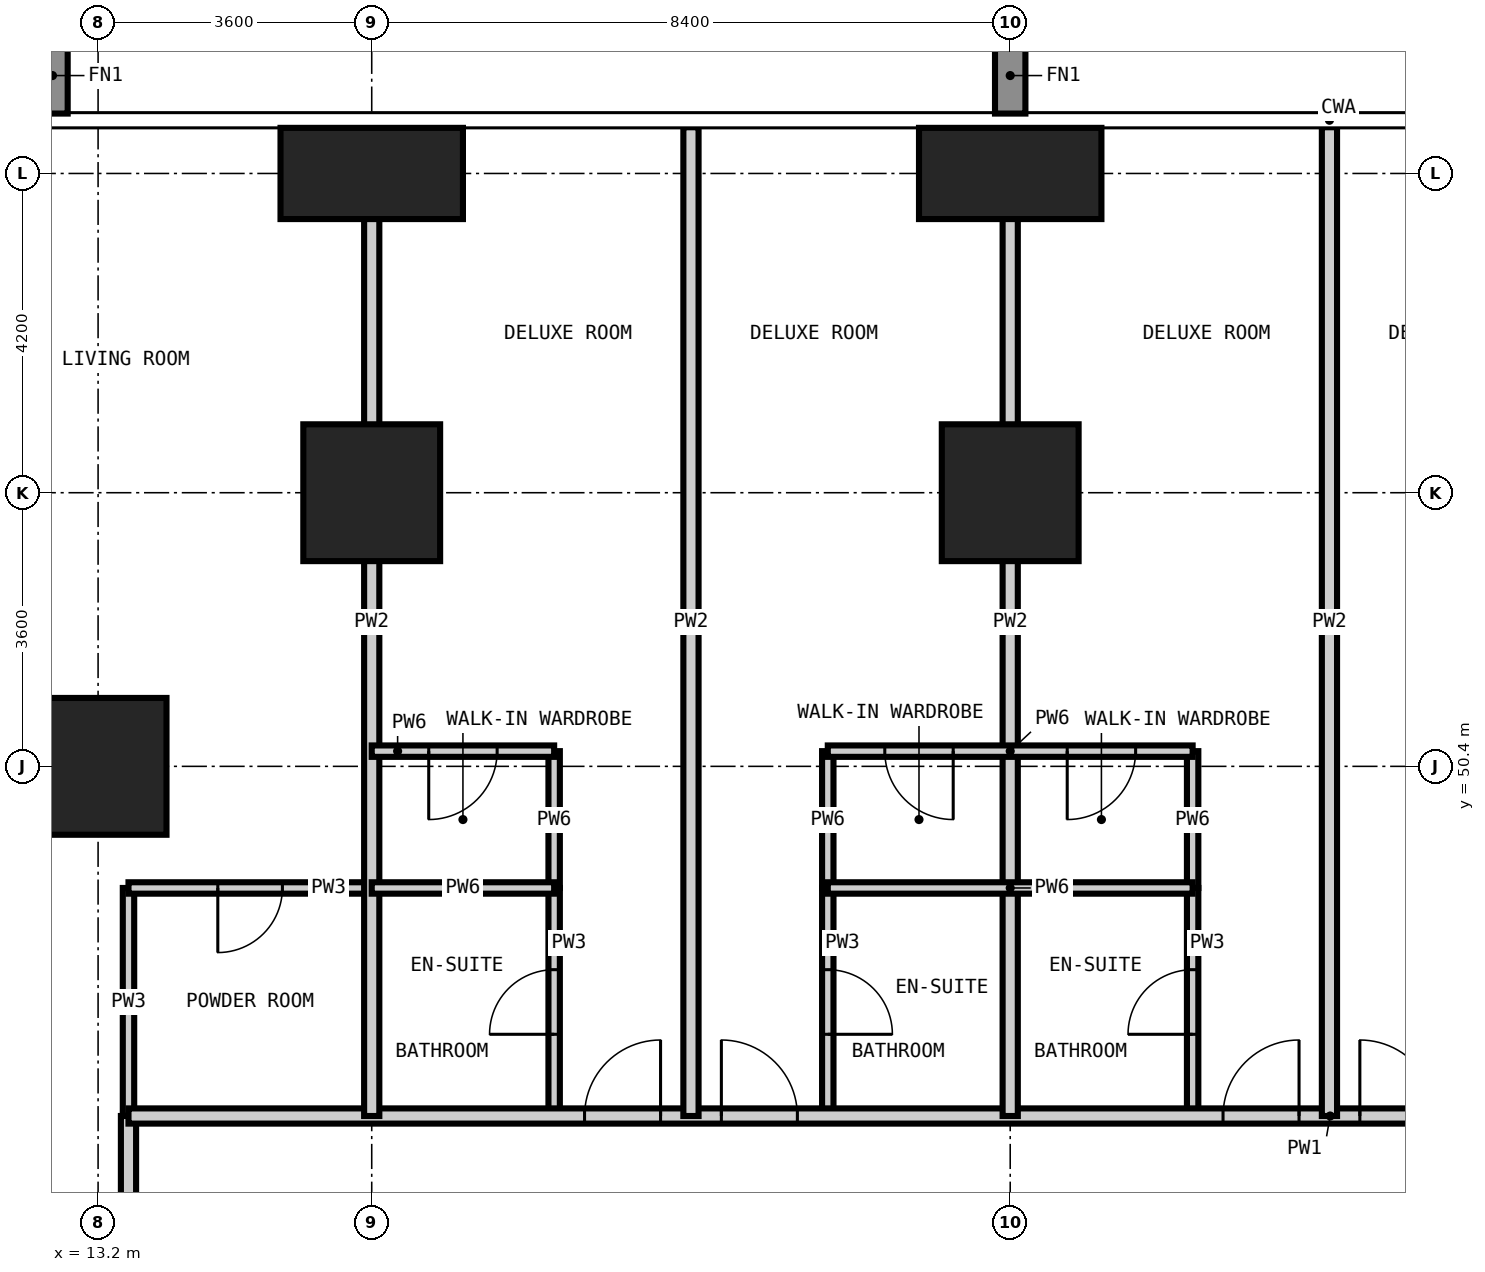
"""IFC4 building model, lengths in metres.
Left out: names, types, materials, properties, quantities, classifications, styles, units other than length and angle.
Written with IfcOpenShell. Run it as: python <this file> out.ifc"""

import sys

from ifc_helpers import new_model, si_unit, direction, frame, frame_2d, origin, origin_2d, place, context, subcontext, project, spatial, rectangle, extrude, element, fill, save


model = new_model("IFC4")
c1 = context("Model", 3, precision=1e-05, world=origin(), true_north=direction((0.0, 1.0)))
c2 = subcontext(c1, "Body", "Model", "MODEL_VIEW")
j1 = project(units=[si_unit("LENGTHUNIT", "METRE"), si_unit("PLANEANGLEUNIT", "RADIAN")], contexts=[c1])
p1 = place(None, origin())
s1 = spatial("IfcSite", under=j1, at=p1, CompositionType="ELEMENT")
p2 = place(p1, origin())
s2 = spatial("IfcBuilding", under=s1, at=p2, CompositionType="ELEMENT")
p3 = place(p2, frame((0.0, 0.0, 30.6)))
s3 = spatial("IfcBuildingStorey", under=s2, at=p3, CompositionType="ELEMENT", Elevation=30.6)
for number, where, z_axis, x_axis in (
    (1, (13.2, 50.4, -0.35), (0.0, 0.0, 1.0), (1.0, 0.0, 0.0)),
    (2, (16.8, 54.0, -0.35), (0.0, 0.0, 1.0), (1.0, 0.0, 0.0)),
):
    element("IfcColumn", number, at=place(p3, frame(where, z_axis=z_axis, x_axis=x_axis)), inside=s3, PredefinedType="COLUMN", context=c2, shape_type="SweptSolid", body=[
        extrude(rectangle(XDim=1.8, YDim=1.8, at=origin_2d()), origin(), (0.0, 0.0, 1.0), 3.6),
    ])
p4 = place(p3, frame((16.8, 58.2, -0.35), z_axis=(0.0, 0.0, 1.0), x_axis=(1.0, 0.0, 0.0)))
e3 = element("IfcColumn", 3, at=p4, inside=s3, PredefinedType="COLUMN", context=c2, shape_type="SweptSolid", body=[
    extrude(rectangle(XDim=2.4, YDim=1.2, at=origin_2d()), origin(), (0.0, 0.0, 1.0), 3.6),
])
p5 = place(p3, frame((25.2, 54.0, -0.35), z_axis=(0.0, 0.0, 1.0), x_axis=(1.0, 0.0, 0.0)))
e4 = element("IfcColumn", 4, at=p5, inside=s3, PredefinedType="COLUMN", context=c2, shape_type="SweptSolid", body=[
    extrude(rectangle(XDim=1.8, YDim=1.8, at=origin_2d()), origin(), (0.0, 0.0, 1.0), 3.6),
])
p6 = place(p3, frame((25.2, 58.2, -0.35), z_axis=(0.0, 0.0, 1.0), x_axis=(1.0, 0.0, 0.0)))
e5 = element("IfcColumn", 5, at=p6, inside=s3, PredefinedType="COLUMN", context=c2, shape_type="SweptSolid", body=[
    extrude(rectangle(XDim=2.4, YDim=1.2, at=origin_2d()), origin(), (0.0, 0.0, 1.0), 3.6),
])
p7 = place(p3, frame((13.6, 45.8, 0.0), z_axis=(0.0, 0.0, 1.0), x_axis=(0.0, 1.0, 0.0)))
e6 = element("IfcWall", 6, at=p7, inside=s3, PredefinedType="PARTITIONING", context=c2, shape_type="SweptSolid", body=[
    extrude(rectangle(XDim=3.0, YDim=0.15, at=frame_2d((1.5, 0.0))), origin(), (0.0, 0.0, 1.0), 3.25),
])
p8 = place(p3, frame((19.2, 45.8, 0.0), z_axis=(0.0, 0.0, 1.0), x_axis=(0.0, 1.0, 0.0)))
e7 = element("IfcWall", 7, at=p8, inside=s3, PredefinedType="PARTITIONING", context=c2, shape_type="SweptSolid", body=[
    extrude(rectangle(XDim=3.0, YDim=0.15, at=frame_2d((1.5, 0.0))), origin(), (0.0, 0.0, 1.0), 3.25),
])
p9 = place(p8, frame((1.075, 0.0, 0.0)))
e8 = element("IfcOpeningElement", 8, at=p9, cuts=e7, PredefinedType="OPENING", context=c2, shape_type="SweptSolid", body=[
    extrude(rectangle(XDim=0.85, YDim=2.1, at=frame_2d((0.425, 1.05))), frame((0.0, 0.085, 0.0), z_axis=(0.0, -1.0, 0.0), x_axis=(1.0, 0.0, 0.0)), (0.0, 0.0, 1.0), 0.17),
])
p10 = place(p3, frame((22.8, 45.8, 0.0), z_axis=(0.0, 0.0, 1.0), x_axis=(0.0, 1.0, 0.0)))
e9 = element("IfcWall", 9, at=p10, inside=s3, PredefinedType="PARTITIONING", context=c2, shape_type="SweptSolid", body=[
    extrude(rectangle(XDim=3.0, YDim=0.15, at=frame_2d((1.5, 0.0))), origin(), (0.0, 0.0, 1.0), 3.25),
])
p11 = place(p10, frame((1.075, 0.0, 0.0)))
e10 = element("IfcOpeningElement", 10, at=p11, cuts=e9, PredefinedType="OPENING", context=c2, shape_type="SweptSolid", body=[
    extrude(rectangle(XDim=0.85, YDim=2.1, at=frame_2d((0.425, 1.05))), frame((0.0, 0.085, 0.0), z_axis=(0.0, -1.0, 0.0), x_axis=(1.0, 0.0, 0.0)), (0.0, 0.0, 1.0), 0.17),
])
p12 = place(p3, frame((27.6, 45.8, 0.0), z_axis=(0.0, 0.0, 1.0), x_axis=(0.0, 1.0, 0.0)))
e11 = element("IfcWall", 11, at=p12, inside=s3, PredefinedType="PARTITIONING", context=c2, shape_type="SweptSolid", body=[
    extrude(rectangle(XDim=3.0, YDim=0.15, at=frame_2d((1.5, 0.0))), origin(), (0.0, 0.0, 1.0), 3.25),
])
p13 = place(p12, frame((1.075, 0.0, 0.0)))
e12 = element("IfcOpeningElement", 12, at=p13, cuts=e11, PredefinedType="OPENING", context=c2, shape_type="SweptSolid", body=[
    extrude(rectangle(XDim=0.85, YDim=2.1, at=frame_2d((0.425, 1.05))), frame((0.0, 0.085, 0.0), z_axis=(0.0, -1.0, 0.0), x_axis=(1.0, 0.0, 0.0)), (0.0, 0.0, 1.0), 0.17),
])
p14 = place(p3, frame((13.6, 48.8, 0.0), z_axis=(0.0, 0.0, 1.0), x_axis=(1.0, 0.0, 0.0)))
e13 = element("IfcWall", 13, at=p14, inside=s3, PredefinedType="PARTITIONING", context=c2, shape_type="SweptSolid", body=[
    extrude(rectangle(XDim=3.2, YDim=0.15, at=frame_2d((1.6, 0.0))), origin(), (0.0, 0.0, 1.0), 3.25),
])
p15 = place(p14, frame((1.175, 0.0, 0.0)))
e14 = element("IfcOpeningElement", 14, at=p15, cuts=e13, PredefinedType="OPENING", context=c2, shape_type="SweptSolid", body=[
    extrude(rectangle(XDim=0.85, YDim=2.1, at=frame_2d((0.425, 1.05))), frame((0.0, 0.085, 0.0), z_axis=(0.0, -1.0, 0.0), x_axis=(1.0, 0.0, 0.0)), (0.0, 0.0, 1.0), 0.17),
])
p16 = place(p3, frame((13.6, 42.0, 0.0), z_axis=(0.0, 0.0, 1.0), x_axis=(0.0, 1.0, 0.0)))
e15 = element("IfcWall", 15, at=p16, inside=s3, PredefinedType="PARTITIONING", context=c2, shape_type="SweptSolid", body=[
    extrude(rectangle(XDim=3.8, YDim=0.2, at=frame_2d((1.9, 0.0))), origin(), (0.0, 0.0, 1.0), 3.25),
])
p17 = place(p16, frame((1.4, 0.0, 0.0)))
e16 = element("IfcOpeningElement", 16, at=p17, cuts=e15, PredefinedType="OPENING", context=c2, shape_type="SweptSolid", body=[
    extrude(rectangle(XDim=1.0, YDim=2.2, at=frame_2d((0.5, 1.1))), frame((0.0, 0.11, 0.0), z_axis=(0.0, -1.0, 0.0), x_axis=(1.0, 0.0, 0.0)), (0.0, 0.0, 1.0), 0.22),
])
p18 = place(p3, frame((13.6, 45.8, 0.0), z_axis=(0.0, 0.0, 1.0), x_axis=(1.0, 0.0, 0.0)))
e17 = element("IfcWall", 17, at=p18, inside=s3, PredefinedType="PARTITIONING", context=c2, shape_type="SweptSolid", body=[
    extrude(rectangle(XDim=31.9, YDim=0.2, at=frame_2d((15.95, 0.0))), origin(), (0.0, 0.0, 1.0), 3.25),
])
p19 = place(p18, frame((6.0, 0.0, 0.0)))
e18 = element("IfcOpeningElement", 18, at=p19, cuts=e17, PredefinedType="OPENING", context=c2, shape_type="SweptSolid", body=[
    extrude(rectangle(XDim=1.0, YDim=2.2, at=frame_2d((0.5, 1.1))), frame((0.0, 0.11, 0.0), z_axis=(0.0, -1.0, 0.0), x_axis=(1.0, 0.0, 0.0)), (0.0, 0.0, 1.0), 0.22),
])
p20 = place(p18, frame((7.8, 0.0, 0.0)))
e19 = element("IfcOpeningElement", 19, at=p20, cuts=e17, PredefinedType="OPENING", context=c2, shape_type="SweptSolid", body=[
    extrude(rectangle(XDim=1.0, YDim=2.2, at=frame_2d((0.5, 1.1))), frame((0.0, 0.11, 0.0), z_axis=(0.0, -1.0, 0.0), x_axis=(1.0, 0.0, 0.0)), (0.0, 0.0, 1.0), 0.22),
])
p21 = place(p18, frame((14.4, 0.0, 0.0)))
e20 = element("IfcOpeningElement", 20, at=p21, cuts=e17, PredefinedType="OPENING", context=c2, shape_type="SweptSolid", body=[
    extrude(rectangle(XDim=1.0, YDim=2.2, at=frame_2d((0.5, 1.1))), frame((0.0, 0.11, 0.0), z_axis=(0.0, -1.0, 0.0), x_axis=(1.0, 0.0, 0.0)), (0.0, 0.0, 1.0), 0.22),
])
p22 = place(p18, frame((16.2, 0.0, 0.0)))
e21 = element("IfcOpeningElement", 21, at=p22, cuts=e17, PredefinedType="OPENING", context=c2, shape_type="SweptSolid", body=[
    extrude(rectangle(XDim=1.0, YDim=2.2, at=frame_2d((0.5, 1.1))), frame((0.0, 0.11, 0.0), z_axis=(0.0, -1.0, 0.0), x_axis=(1.0, 0.0, 0.0)), (0.0, 0.0, 1.0), 0.22),
])
p23 = place(p18, frame((22.8, 0.0, 0.0)))
e22 = element("IfcOpeningElement", 22, at=p23, cuts=e17, PredefinedType="OPENING", context=c2, shape_type="SweptSolid", body=[
    extrude(rectangle(XDim=1.0, YDim=2.2, at=frame_2d((0.5, 1.1))), frame((0.0, 0.11, 0.0), z_axis=(0.0, -1.0, 0.0), x_axis=(1.0, 0.0, 0.0)), (0.0, 0.0, 1.0), 0.22),
])
p24 = place(p18, frame((24.6, 0.0, 0.0)))
e23 = element("IfcOpeningElement", 23, at=p24, cuts=e17, PredefinedType="OPENING", context=c2, shape_type="SweptSolid", body=[
    extrude(rectangle(XDim=1.0, YDim=2.2, at=frame_2d((0.5, 1.1))), frame((0.0, 0.11, 0.0), z_axis=(0.0, -1.0, 0.0), x_axis=(1.0, 0.0, 0.0)), (0.0, 0.0, 1.0), 0.22),
])
for number, where, z_axis, x_axis in (
    (24, (16.8, 45.8, 0.0), (0.0, 0.0, 1.0), (0.0, 1.0, 0.0)),
    (25, (21.0, 45.8, 0.0), (0.0, 0.0, 1.0), (0.0, 1.0, 0.0)),
    (26, (25.2, 45.8, 0.0), (0.0, 0.0, 1.0), (0.0, 1.0, 0.0)),
    (27, (29.4, 45.8, 0.0), (0.0, 0.0, 1.0), (0.0, 1.0, 0.0)),
):
    element("IfcWall", number, at=place(p3, frame(where, z_axis=z_axis, x_axis=x_axis)), inside=s3, PredefinedType="PARTITIONING", context=c2, shape_type="SweptSolid", body=[
        extrude(rectangle(XDim=13.008, YDim=0.2, at=frame_2d((6.504, 0.0))), origin(), (0.0, 0.0, 1.0), 3.25),
    ])
for number, where, z_axis, x_axis in (
    (28, (19.2, 48.8, 0.0), (0.0, 0.0, 1.0), (0.0, 1.0, 0.0)),
    (29, (22.8, 48.8, 0.0), (0.0, 0.0, 1.0), (0.0, 1.0, 0.0)),
    (30, (27.6, 48.8, 0.0), (0.0, 0.0, 1.0), (0.0, 1.0, 0.0)),
):
    element("IfcWall", number, at=place(p3, frame(where, z_axis=z_axis, x_axis=x_axis)), inside=s3, PredefinedType="PARTITIONING", context=c2, shape_type="SweptSolid", body=[
        extrude(rectangle(XDim=1.8, YDim=0.15, at=frame_2d((0.9, 0.0))), origin(), (0.0, 0.0, 1.0), 3.25),
    ])
p25 = place(p3, frame((16.8, 48.8, 0.0), z_axis=(0.0, 0.0, 1.0), x_axis=(1.0, 0.0, 0.0)))
e31 = element("IfcWall", 31, at=p25, inside=s3, PredefinedType="PARTITIONING", context=c2, shape_type="SweptSolid", body=[
    extrude(rectangle(XDim=2.4, YDim=0.15, at=frame_2d((1.2, 0.0))), origin(), (0.0, 0.0, 1.0), 3.25),
])
p26 = place(p3, frame((22.8, 48.8, 0.0), z_axis=(0.0, 0.0, 1.0), x_axis=(1.0, 0.0, 0.0)))
e32 = element("IfcWall", 32, at=p26, inside=s3, PredefinedType="PARTITIONING", context=c2, shape_type="SweptSolid", body=[
    extrude(rectangle(XDim=4.8, YDim=0.15, at=frame_2d((2.4, 0.0))), origin(), (0.0, 0.0, 1.0), 3.25),
])
p27 = place(p3, frame((16.8, 50.6, 0.0), z_axis=(0.0, 0.0, 1.0), x_axis=(1.0, 0.0, 0.0)))
e33 = element("IfcWall", 33, at=p27, inside=s3, PredefinedType="PARTITIONING", context=c2, shape_type="SweptSolid", body=[
    extrude(rectangle(XDim=2.4, YDim=0.15, at=frame_2d((1.2, 0.0))), origin(), (0.0, 0.0, 1.0), 3.25),
])
p28 = place(p27, frame((0.75, 0.0, 0.0)))
e34 = element("IfcOpeningElement", 34, at=p28, cuts=e33, PredefinedType="OPENING", context=c2, shape_type="SweptSolid", body=[
    extrude(rectangle(XDim=0.9, YDim=2.1, at=frame_2d((0.45, 1.05))), frame((0.0, 0.085, 0.0), z_axis=(0.0, -1.0, 0.0), x_axis=(1.0, 0.0, 0.0)), (0.0, 0.0, 1.0), 0.17),
])
p29 = place(p3, frame((22.8, 50.6, 0.0), z_axis=(0.0, 0.0, 1.0), x_axis=(1.0, 0.0, 0.0)))
e35 = element("IfcWall", 35, at=p29, inside=s3, PredefinedType="PARTITIONING", context=c2, shape_type="SweptSolid", body=[
    extrude(rectangle(XDim=4.8, YDim=0.15, at=frame_2d((2.4, 0.0))), origin(), (0.0, 0.0, 1.0), 3.25),
])
p30 = place(p29, frame((0.75, 0.0, 0.0)))
e36 = element("IfcOpeningElement", 36, at=p30, cuts=e35, PredefinedType="OPENING", context=c2, shape_type="SweptSolid", body=[
    extrude(rectangle(XDim=0.9, YDim=2.1, at=frame_2d((0.45, 1.05))), frame((0.0, 0.085, 0.0), z_axis=(0.0, -1.0, 0.0), x_axis=(1.0, 0.0, 0.0)), (0.0, 0.0, 1.0), 0.17),
])
p31 = place(p29, frame((3.15, 0.0, 0.0)))
e37 = element("IfcOpeningElement", 37, at=p31, cuts=e35, PredefinedType="OPENING", context=c2, shape_type="SweptSolid", body=[
    extrude(rectangle(XDim=0.9, YDim=2.1, at=frame_2d((0.45, 1.05))), frame((0.0, 0.085, 0.0), z_axis=(0.0, -1.0, 0.0), x_axis=(1.0, 0.0, 0.0)), (0.0, 0.0, 1.0), 0.17),
])
p32 = place(p19, origin())
e38 = element("IfcDoor", 38, at=p32, inside=s3, OperationType="SINGLE_SWING_RIGHT", PredefinedType="DOOR", context=c2, shape_type="SweptSolid", body=[
    extrude(rectangle(XDim=1.0, YDim=2.2, at=frame_2d((0.5, 1.1))), frame((0.0, 0.025, 0.0), z_axis=(0.0, -1.0, 0.0), x_axis=(1.0, 0.0, 0.0)), (0.0, 0.0, 1.0), 0.05),
])
fill(e18, e38)
p33 = place(p9, origin())
e39 = element("IfcDoor", 39, at=p33, inside=s3, OperationType="SINGLE_SWING_LEFT", PredefinedType="DOOR", context=c2, shape_type="SweptSolid", body=[
    extrude(rectangle(XDim=0.85, YDim=2.1, at=frame_2d((0.425, 1.05))), frame((0.0, 0.025, 0.0), z_axis=(0.0, -1.0, 0.0), x_axis=(1.0, 0.0, 0.0)), (0.0, 0.0, 1.0), 0.05),
])
fill(e8, e39)
p34 = place(p28, frame((0.9, 0.0, 0.0), z_axis=(0.0, 0.0, 1.0), x_axis=(-1.0, 0.0, 0.0)))
e40 = element("IfcDoor", 40, at=p34, inside=s3, OperationType="SINGLE_SWING_RIGHT", PredefinedType="DOOR", context=c2, shape_type="SweptSolid", body=[
    extrude(rectangle(XDim=0.9, YDim=2.1, at=frame_2d((0.45, 1.05))), frame((0.0, 0.025, 0.0), z_axis=(0.0, -1.0, 0.0), x_axis=(1.0, 0.0, 0.0)), (0.0, 0.0, 1.0), 0.05),
])
fill(e34, e40)
p35 = place(p20, origin())
e41 = element("IfcDoor", 41, at=p35, inside=s3, OperationType="SINGLE_SWING_LEFT", PredefinedType="DOOR", context=c2, shape_type="SweptSolid", body=[
    extrude(rectangle(XDim=1.0, YDim=2.2, at=frame_2d((0.5, 1.1))), frame((0.0, 0.025, 0.0), z_axis=(0.0, -1.0, 0.0), x_axis=(1.0, 0.0, 0.0)), (0.0, 0.0, 1.0), 0.05),
])
fill(e19, e41)
p36 = place(p11, frame((0.85, 0.0, 0.0), z_axis=(0.0, 0.0, 1.0), x_axis=(-1.0, 0.0, 0.0)))
e42 = element("IfcDoor", 42, at=p36, inside=s3, OperationType="SINGLE_SWING_RIGHT", PredefinedType="DOOR", context=c2, shape_type="SweptSolid", body=[
    extrude(rectangle(XDim=0.85, YDim=2.1, at=frame_2d((0.425, 1.05))), frame((0.0, 0.025, 0.0), z_axis=(0.0, -1.0, 0.0), x_axis=(1.0, 0.0, 0.0)), (0.0, 0.0, 1.0), 0.05),
])
fill(e10, e42)
p37 = place(p30, frame((0.9, 0.0, 0.0), z_axis=(0.0, 0.0, 1.0), x_axis=(-1.0, 0.0, 0.0)))
e43 = element("IfcDoor", 43, at=p37, inside=s3, OperationType="SINGLE_SWING_LEFT", PredefinedType="DOOR", context=c2, shape_type="SweptSolid", body=[
    extrude(rectangle(XDim=0.9, YDim=2.1, at=frame_2d((0.45, 1.05))), frame((0.0, 0.025, 0.0), z_axis=(0.0, -1.0, 0.0), x_axis=(1.0, 0.0, 0.0)), (0.0, 0.0, 1.0), 0.05),
])
fill(e36, e43)
p38 = place(p21, origin())
e44 = element("IfcDoor", 44, at=p38, inside=s3, OperationType="SINGLE_SWING_RIGHT", PredefinedType="DOOR", context=c2, shape_type="SweptSolid", body=[
    extrude(rectangle(XDim=1.0, YDim=2.2, at=frame_2d((0.5, 1.1))), frame((0.0, 0.025, 0.0), z_axis=(0.0, -1.0, 0.0), x_axis=(1.0, 0.0, 0.0)), (0.0, 0.0, 1.0), 0.05),
])
fill(e20, e44)
p39 = place(p13, origin())
e45 = element("IfcDoor", 45, at=p39, inside=s3, OperationType="SINGLE_SWING_LEFT", PredefinedType="DOOR", context=c2, shape_type="SweptSolid", body=[
    extrude(rectangle(XDim=0.85, YDim=2.1, at=frame_2d((0.425, 1.05))), frame((0.0, 0.025, 0.0), z_axis=(0.0, -1.0, 0.0), x_axis=(1.0, 0.0, 0.0)), (0.0, 0.0, 1.0), 0.05),
])
fill(e12, e45)
p40 = place(p31, frame((0.9, 0.0, 0.0), z_axis=(0.0, 0.0, 1.0), x_axis=(-1.0, 0.0, 0.0)))
e46 = element("IfcDoor", 46, at=p40, inside=s3, OperationType="SINGLE_SWING_RIGHT", PredefinedType="DOOR", context=c2, shape_type="SweptSolid", body=[
    extrude(rectangle(XDim=0.9, YDim=2.1, at=frame_2d((0.45, 1.05))), frame((0.0, 0.025, 0.0), z_axis=(0.0, -1.0, 0.0), x_axis=(1.0, 0.0, 0.0)), (0.0, 0.0, 1.0), 0.05),
])
fill(e37, e46)
p41 = place(p22, origin())
e47 = element("IfcDoor", 47, at=p41, inside=s3, OperationType="SINGLE_SWING_LEFT", PredefinedType="DOOR", context=c2, shape_type="SweptSolid", body=[
    extrude(rectangle(XDim=1.0, YDim=2.2, at=frame_2d((0.5, 1.1))), frame((0.0, 0.025, 0.0), z_axis=(0.0, -1.0, 0.0), x_axis=(1.0, 0.0, 0.0)), (0.0, 0.0, 1.0), 0.05),
])
fill(e21, e47)
p42 = place(p15, frame((0.85, 0.0, 0.0), z_axis=(0.0, 0.0, 1.0), x_axis=(-1.0, 0.0, 0.0)))
e48 = element("IfcDoor", 48, at=p42, inside=s3, OperationType="SINGLE_SWING_RIGHT", PredefinedType="DOOR", context=c2, shape_type="SweptSolid", body=[
    extrude(rectangle(XDim=0.85, YDim=2.1, at=frame_2d((0.425, 1.05))), frame((0.0, 0.025, 0.0), z_axis=(0.0, -1.0, 0.0), x_axis=(1.0, 0.0, 0.0)), (0.0, 0.0, 1.0), 0.05),
])
fill(e14, e48)
save(model, sys.argv[1])
